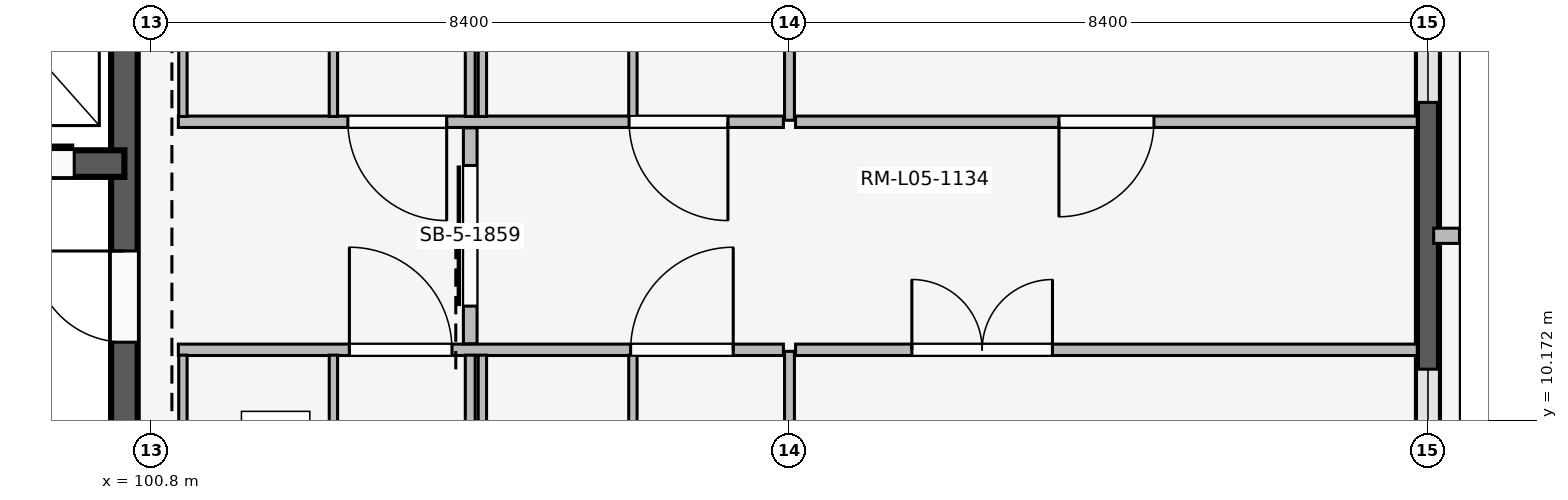
"""IFC4 building model, lengths in metres.
Left out: names, types, materials, properties, quantities, classifications, styles, units other than length and angle.
Written with IfcOpenShell. Run it as: python <this file> out.ifc"""

import sys

from ifc_helpers import new_model, si_unit, direction, frame, frame_2d, origin, place, context, subcontext, project, spatial, rectangle, extrude, element, fill, save


model = new_model("IFC4")
c1 = context("Model", 3, precision=1e-05, world=origin(), true_north=direction((0.0, 1.0)))
c2 = subcontext(c1, "Body", "Model", "MODEL_VIEW")
j1 = project(units=[si_unit("LENGTHUNIT", "METRE"), si_unit("PLANEANGLEUNIT", "RADIAN")], contexts=[c1])
p1 = place(None, origin())
s1 = spatial("IfcSite", under=j1, at=p1, CompositionType="ELEMENT")
p2 = place(p1, origin())
s2 = spatial("IfcBuilding", under=s1, at=p2, CompositionType="ELEMENT")
p3 = place(p2, frame((0.0, 0.0, 20.4)))
s3 = spatial("IfcBuildingStorey", under=s2, at=p3, CompositionType="ELEMENT", Elevation=20.4)
p4 = place(p3, frame((117.6, 16.48, 0.0), z_axis=(0.0, 0.0, 1.0), x_axis=(0.0, -1.0, 0.0)))
e1 = element("IfcWall", 1, at=p4, inside=s3, PredefinedType="SOLIDWALL", context=c2, shape_type="SweptSolid", body=[
    extrude(rectangle(XDim=7.76, YDim=0.29, at=frame_2d((3.88, 0.0))), origin(), (0.0, 0.0, 1.0), 3.34),
])
p5 = place(p4, frame((0.925, 0.0, 0.85)))
e2 = element("IfcOpeningElement", 2, at=p5, cuts=e1, PredefinedType="OPENING", context=c2, shape_type="SweptSolid", body=[
    extrude(rectangle(XDim=1.2, YDim=1.55, at=frame_2d((0.6, 0.775))), frame((0.0, 0.155, 0.0), z_axis=(0.0, -1.0, 0.0), x_axis=(1.0, 0.0, 0.0)), (0.0, 0.0, 1.0), 0.31),
])
p6 = place(p4, frame((5.635, 0.0, 0.85)))
e3 = element("IfcOpeningElement", 3, at=p6, cuts=e1, PredefinedType="OPENING", context=c2, shape_type="SweptSolid", body=[
    extrude(rectangle(XDim=1.2, YDim=1.55, at=frame_2d((0.6, 0.775))), frame((0.0, 0.155, 0.0), z_axis=(0.0, -1.0, 0.0), x_axis=(1.0, 0.0, 0.0)), (0.0, 0.0, 1.0), 0.31),
])
p7 = place(p3, frame((117.675, 12.6, 0.0), z_axis=(0.0, 0.0, 1.0), x_axis=(1.0, 0.0, 0.0)))
e4 = element("IfcWall", 4, at=p7, inside=s3, PredefinedType="ELEMENTEDWALL", context=c2, shape_type="SweptSolid", body=[
    extrude(rectangle(XDim=0.34, YDim=0.2, at=frame_2d((0.17, 0.0))), origin(), (0.0, 0.0, 1.0), 3.32),
])
p8 = place(p3, frame((100.45, 8.8, 0.0), z_axis=(0.0, 0.0, 1.0), x_axis=(0.0, 1.0, 0.0)))
e5 = element("IfcWall", 5, at=p8, inside=s3, PredefinedType="SHEAR", context=c2, shape_type="SweptSolid", body=[
    extrude(rectangle(XDim=7.55, YDim=0.35, at=frame_2d((3.775, 0.0))), origin(), (0.0, 0.0, 1.0), 3.92),
])
p9 = place(p8, frame((2.4, 0.0, 0.0)))
e6 = element("IfcOpeningElement", 6, at=p9, cuts=e5, PredefinedType="OPENING", context=c2, shape_type="SweptSolid", body=[
    extrude(rectangle(XDim=1.2, YDim=2.2, at=frame_2d((0.6, 1.1))), frame((0.0, 0.185, 0.0), z_axis=(0.0, -1.0, 0.0), x_axis=(1.0, 0.0, 0.0)), (0.0, 0.0, 1.0), 0.37),
])
p10 = place(p3, frame((96.65, 13.55, 0.0), z_axis=(0.0, 0.0, 1.0), x_axis=(1.0, 0.0, 0.0)))
e7 = element("IfcWall", 7, at=p10, inside=s3, PredefinedType="SHEAR", context=c2, shape_type="SweptSolid", body=[
    extrude(rectangle(XDim=3.8, YDim=0.35, at=frame_2d((1.9, 0.0))), origin(), (0.0, 0.0, 1.0), 3.92),
])
p11 = place(p10, frame((0.32, 0.0, 0.0)))
e8 = element("IfcOpeningElement", 8, at=p11, cuts=e7, PredefinedType="OPENING", context=c2, shape_type="SweptSolid", body=[
    extrude(rectangle(XDim=1.4, YDim=2.25, at=frame_2d((0.7, 1.125))), frame((0.0, 0.185, 0.0), z_axis=(0.0, -1.0, 0.0), x_axis=(1.0, 0.0, 0.0)), (0.0, 0.0, 1.0), 0.37),
])
p12 = place(p10, frame((2.04, 0.0, 0.0)))
e9 = element("IfcOpeningElement", 9, at=p12, cuts=e7, PredefinedType="OPENING", context=c2, shape_type="SweptSolid", body=[
    extrude(rectangle(XDim=1.1, YDim=2.15, at=frame_2d((0.55, 1.075))), frame((0.0, 0.185, 0.0), z_axis=(0.0, -1.0, 0.0), x_axis=(1.0, 0.0, 0.0)), (0.0, 0.0, 1.0), 0.37),
])
p13 = place(p3, frame((101.16, 11.1, 0.0), z_axis=(0.0, 0.0, 1.0), x_axis=(1.0, 0.0, 0.0)))
e10 = element("IfcWall", 10, at=p13, inside=s3, PredefinedType="PARTITIONING", context=c2, shape_type="SweptSolid", body=[
    extrude(rectangle(XDim=7.96, YDim=0.15, at=frame_2d((3.98, 0.0))), origin(), (0.0, 0.0, 1.0), 3.32),
])
p14 = place(p13, frame((2.25, 0.0, 0.0)))
e11 = element("IfcOpeningElement", 11, at=p14, cuts=e10, PredefinedType="OPENING", context=c2, shape_type="SweptSolid", body=[
    extrude(rectangle(XDim=1.35, YDim=2.25, at=frame_2d((0.675, 1.125))), frame((0.0, 0.085, 0.0), z_axis=(0.0, -1.0, 0.0), x_axis=(1.0, 0.0, 0.0)), (0.0, 0.0, 1.0), 0.17),
])
p15 = place(p13, frame((5.95, 0.0, 0.0)))
e12 = element("IfcOpeningElement", 12, at=p15, cuts=e10, PredefinedType="OPENING", context=c2, shape_type="SweptSolid", body=[
    extrude(rectangle(XDim=1.35, YDim=2.25, at=frame_2d((0.675, 1.125))), frame((0.0, 0.085, 0.0), z_axis=(0.0, -1.0, 0.0), x_axis=(1.0, 0.0, 0.0)), (0.0, 0.0, 1.0), 0.17),
])
p16 = place(p3, frame((105.0, 0.1, 0.0), z_axis=(0.0, 0.0, 1.0), x_axis=(0.0, 1.0, 0.0)))
e13 = element("IfcWall", 13, at=p16, inside=s3, PredefinedType="PARTITIONING", context=c2, shape_type="SweptSolid", body=[
    extrude(rectangle(XDim=10.93, YDim=0.13, at=frame_2d((5.465, 0.0))), origin(), (0.0, 0.0, 1.0), 3.32),
])
for number, where, z_axis, x_axis in (
    (14, (101.22, 8.42, 0.0), (0.0, 0.0, 1.0), (0.0, 1.0, 0.0)),
    (15, (103.2, 8.42, 0.0), (0.0, 0.0, 1.0), (0.0, 1.0, 0.0)),
    (16, (105.16, 8.42, 0.0), (0.0, 0.0, 1.0), (0.0, 1.0, 0.0)),
    (17, (107.14, 8.42, 0.0), (0.0, 0.0, 1.0), (0.0, 1.0, 0.0)),
):
    element("IfcWall", number, at=place(p3, frame(where, z_axis=z_axis, x_axis=x_axis)), inside=s3, PredefinedType="PARTITIONING", context=c2, shape_type="SweptSolid", body=[
        extrude(rectangle(XDim=2.61, YDim=0.11, at=frame_2d((1.305, 0.0))), origin(), (0.0, 0.0, 1.0), 3.32),
    ])
p17 = place(p3, frame((109.12, 14.1, 0.0), z_axis=(0.0, 0.0, 1.0), x_axis=(-1.0, 0.0, 0.0)))
e18 = element("IfcWall", 18, at=p17, inside=s3, PredefinedType="PARTITIONING", context=c2, shape_type="SweptSolid", body=[
    extrude(rectangle(XDim=7.96, YDim=0.15, at=frame_2d((3.98, 0.0))), origin(), (0.0, 0.0, 1.0), 3.32),
])
p18 = place(p17, frame((0.73, 0.0, 0.0)))
e19 = element("IfcOpeningElement", 19, at=p18, cuts=e18, PredefinedType="OPENING", context=c2, shape_type="SweptSolid", body=[
    extrude(rectangle(XDim=1.3, YDim=2.25, at=frame_2d((0.65, 1.125))), frame((0.0, 0.085, 0.0), z_axis=(0.0, -1.0, 0.0), x_axis=(1.0, 0.0, 0.0)), (0.0, 0.0, 1.0), 0.17),
])
p19 = place(p17, frame((4.43, 0.0, 0.0)))
e20 = element("IfcOpeningElement", 20, at=p19, cuts=e18, PredefinedType="OPENING", context=c2, shape_type="SweptSolid", body=[
    extrude(rectangle(XDim=1.3, YDim=2.25, at=frame_2d((0.65, 1.125))), frame((0.0, 0.085, 0.0), z_axis=(0.0, -1.0, 0.0), x_axis=(1.0, 0.0, 0.0)), (0.0, 0.0, 1.0), 0.17),
])
p20 = place(p3, frame((105.0, 14.17, 0.0), z_axis=(0.0, 0.0, 1.0), x_axis=(0.0, 1.0, 0.0)))
e21 = element("IfcWall", 21, at=p20, inside=s3, PredefinedType="PARTITIONING", context=c2, shape_type="SweptSolid", body=[
    extrude(rectangle(XDim=10.93, YDim=0.13, at=frame_2d((5.465, 0.0))), origin(), (0.0, 0.0, 1.0), 3.32),
])
for number, where, z_axis, x_axis in (
    (22, (101.22, 14.17, 0.0), (0.0, 0.0, 1.0), (0.0, 1.0, 0.0)),
    (23, (103.2, 14.17, 0.0), (0.0, 0.0, 1.0), (0.0, 1.0, 0.0)),
    (24, (105.16, 14.17, 0.0), (0.0, 0.0, 1.0), (0.0, 1.0, 0.0)),
    (25, (107.14, 14.17, 0.0), (0.0, 0.0, 1.0), (0.0, 1.0, 0.0)),
):
    element("IfcWall", number, at=place(p3, frame(where, z_axis=z_axis, x_axis=x_axis)), inside=s3, PredefinedType="PARTITIONING", context=c2, shape_type="SweptSolid", body=[
        extrude(rectangle(XDim=2.61, YDim=0.11, at=frame_2d((1.305, 0.0))), origin(), (0.0, 0.0, 1.0), 3.32),
    ])
p21 = place(p3, frame((105.0, 11.18, 0.0), z_axis=(0.0, 0.0, 1.0), x_axis=(0.0, 1.0, 0.0)))
e26 = element("IfcWall", 26, at=p21, inside=s3, PredefinedType="PARTITIONING", context=c2, shape_type="SweptSolid", body=[
    extrude(rectangle(XDim=2.84, YDim=0.18, at=frame_2d((1.42, 0.0))), origin(), (0.0, 0.0, 1.0), 3.32),
])
p22 = place(p21, frame((0.495, 0.0, 0.0)))
e27 = element("IfcOpeningElement", 27, at=p22, cuts=e26, PredefinedType="OPENING", context=c2, shape_type="SweptSolid", body=[
    extrude(rectangle(XDim=1.85, YDim=2.3, at=frame_2d((0.925, 1.15))), frame((0.0, 0.1, 0.0), z_axis=(0.0, -1.0, 0.0), x_axis=(1.0, 0.0, 0.0)), (0.0, 0.0, 1.0), 0.2),
])
p23 = place(p3, frame((109.2, 0.14, 0.0), z_axis=(0.0, 0.0, 1.0), x_axis=(0.0, 1.0, 0.0)))
e28 = element("IfcWall", 28, at=p23, inside=s3, PredefinedType="PARTITIONING", context=c2, shape_type="SweptSolid", body=[
    extrude(rectangle(XDim=10.94, YDim=0.13, at=frame_2d((5.47, 0.0))), origin(), (0.0, 0.0, 1.0), 3.32),
])
p24 = place(p3, frame((109.2, 14.12, 0.0), z_axis=(0.0, 0.0, 1.0), x_axis=(0.0, 1.0, 0.0)))
e29 = element("IfcWall", 29, at=p24, inside=s3, PredefinedType="PARTITIONING", context=c2, shape_type="SweptSolid", body=[
    extrude(rectangle(XDim=10.94, YDim=0.13, at=frame_2d((5.47, 0.0))), origin(), (0.0, 0.0, 1.0), 3.32),
])
p25 = place(p3, frame((109.28, 11.1, 0.0), z_axis=(0.0, 0.0, 1.0), x_axis=(1.0, 0.0, 0.0)))
e30 = element("IfcWall", 30, at=p25, inside=s3, PredefinedType="PARTITIONING", context=c2, shape_type="SweptSolid", body=[
    extrude(rectangle(XDim=8.18, YDim=0.15, at=frame_2d((4.09, 0.0))), origin(), (0.0, 0.0, 1.0), 3.32),
])
p26 = place(p25, frame((1.53, 0.0, 0.0)))
e31 = element("IfcOpeningElement", 31, at=p26, cuts=e30, PredefinedType="OPENING", context=c2, shape_type="SweptSolid", body=[
    extrude(rectangle(XDim=1.85, YDim=2.3, at=frame_2d((0.925, 1.15))), frame((0.0, 0.085, 0.0), z_axis=(0.0, -1.0, 0.0), x_axis=(1.0, 0.0, 0.0)), (0.0, 0.0, 1.0), 0.17),
])
p27 = place(p3, frame((117.46, 14.1, 0.0), z_axis=(0.0, 0.0, 1.0), x_axis=(-1.0, 0.0, 0.0)))
e32 = element("IfcWall", 32, at=p27, inside=s3, PredefinedType="PARTITIONING", context=c2, shape_type="SweptSolid", body=[
    extrude(rectangle(XDim=8.18, YDim=0.15, at=frame_2d((4.09, 0.0))), origin(), (0.0, 0.0, 1.0), 3.32),
])
p28 = place(p27, frame((3.465, 0.0, 0.0)))
e33 = element("IfcOpeningElement", 33, at=p28, cuts=e32, PredefinedType="OPENING", context=c2, shape_type="SweptSolid", body=[
    extrude(rectangle(XDim=1.25, YDim=2.2, at=frame_2d((0.625, 1.1))), frame((0.0, 0.085, 0.0), z_axis=(0.0, -1.0, 0.0), x_axis=(1.0, 0.0, 0.0)), (0.0, 0.0, 1.0), 0.17),
])
p29 = place(p5, origin())
e34 = element("IfcWindow", 34, at=p29, inside=s3, PartitioningType="SINGLE_PANEL", PredefinedType="WINDOW", context=c2, shape_type="SweptSolid", body=[
    extrude(rectangle(XDim=1.2, YDim=1.55, at=frame_2d((0.6, 0.775))), frame((0.0, 0.03, 0.0), z_axis=(0.0, -1.0, 0.0), x_axis=(1.0, 0.0, 0.0)), (0.0, 0.0, 1.0), 0.06),
])
fill(e2, e34)
p30 = place(p6, origin())
e35 = element("IfcWindow", 35, at=p30, inside=s3, PartitioningType="SINGLE_PANEL", PredefinedType="WINDOW", context=c2, shape_type="SweptSolid", body=[
    extrude(rectangle(XDim=1.2, YDim=1.55, at=frame_2d((0.6, 0.775))), frame((0.0, 0.03, 0.0), z_axis=(0.0, -1.0, 0.0), x_axis=(1.0, 0.0, 0.0)), (0.0, 0.0, 1.0), 0.06),
])
fill(e3, e35)
p31 = place(p9, origin())
e36 = element("IfcDoor", 36, at=p31, inside=s3, OperationType="SINGLE_SWING_RIGHT", PredefinedType="DOOR", context=c2, shape_type="SweptSolid", body=[
    extrude(rectangle(XDim=1.2, YDim=2.2, at=frame_2d((0.6, 1.1))), frame((0.0, 0.025, 0.0), z_axis=(0.0, -1.0, 0.0), x_axis=(1.0, 0.0, 0.0)), (0.0, 0.0, 1.0), 0.05),
])
fill(e6, e36)
p32 = place(p12, origin())
e37 = element("IfcDoor", 37, at=p32, inside=s3, OperationType="SLIDING_TO_LEFT", PredefinedType="DOOR", context=c2, shape_type="SweptSolid", body=[
    extrude(rectangle(XDim=1.1, YDim=2.15, at=frame_2d((0.55, 1.075))), frame((0.0, 0.025, 0.0), z_axis=(0.0, -1.0, 0.0), x_axis=(1.0, 0.0, 0.0)), (0.0, 0.0, 1.0), 0.05),
])
fill(e9, e37)
p33 = place(p14, origin())
e38 = element("IfcDoor", 38, at=p33, inside=s3, OperationType="SINGLE_SWING_LEFT", PredefinedType="DOOR", context=c2, shape_type="SweptSolid", body=[
    extrude(rectangle(XDim=1.35, YDim=2.25, at=frame_2d((0.675, 1.125))), frame((0.0, 0.025, 0.0), z_axis=(0.0, -1.0, 0.0), x_axis=(1.0, 0.0, 0.0)), (0.0, 0.0, 1.0), 0.05),
])
fill(e11, e38)
p34 = place(p15, origin())
e39 = element("IfcDoor", 39, at=p34, inside=s3, OperationType="SINGLE_SWING_RIGHT", PredefinedType="DOOR", context=c2, shape_type="SweptSolid", body=[
    extrude(rectangle(XDim=1.35, YDim=2.25, at=frame_2d((0.675, 1.125))), frame((0.0, 0.025, 0.0), z_axis=(0.0, -1.0, 0.0), x_axis=(1.0, 0.0, 0.0)), (0.0, 0.0, 1.0), 0.05),
])
fill(e12, e39)
p35 = place(p18, origin())
e40 = element("IfcDoor", 40, at=p35, inside=s3, OperationType="SINGLE_SWING_LEFT", PredefinedType="DOOR", context=c2, shape_type="SweptSolid", body=[
    extrude(rectangle(XDim=1.3, YDim=2.25, at=frame_2d((0.65, 1.125))), frame((0.0, 0.025, 0.0), z_axis=(0.0, -1.0, 0.0), x_axis=(1.0, 0.0, 0.0)), (0.0, 0.0, 1.0), 0.05),
])
fill(e19, e40)
p36 = place(p19, origin())
e41 = element("IfcDoor", 41, at=p36, inside=s3, OperationType="SINGLE_SWING_LEFT", PredefinedType="DOOR", context=c2, shape_type="SweptSolid", body=[
    extrude(rectangle(XDim=1.3, YDim=2.25, at=frame_2d((0.65, 1.125))), frame((0.0, 0.025, 0.0), z_axis=(0.0, -1.0, 0.0), x_axis=(1.0, 0.0, 0.0)), (0.0, 0.0, 1.0), 0.05),
])
fill(e20, e41)
p37 = place(p22, origin())
e42 = element("IfcDoor", 42, at=p37, inside=s3, OperationType="SLIDING_TO_LEFT", PredefinedType="DOOR", context=c2, shape_type="SweptSolid", body=[
    extrude(rectangle(XDim=1.85, YDim=2.3, at=frame_2d((0.925, 1.15))), frame((0.0, 0.025, 0.0), z_axis=(0.0, -1.0, 0.0), x_axis=(1.0, 0.0, 0.0)), (0.0, 0.0, 1.0), 0.05),
])
fill(e27, e42)
p38 = place(p26, origin())
e43 = element("IfcDoor", 43, at=p38, inside=s3, OperationType="DOUBLE_SWING_LEFT", PredefinedType="DOOR", context=c2, shape_type="SweptSolid", body=[
    extrude(rectangle(XDim=1.85, YDim=2.3, at=frame_2d((0.925, 1.15))), frame((0.0, 0.025, 0.0), z_axis=(0.0, -1.0, 0.0), x_axis=(1.0, 0.0, 0.0)), (0.0, 0.0, 1.0), 0.05),
])
fill(e31, e43)
p39 = place(p28, origin())
e44 = element("IfcDoor", 44, at=p39, inside=s3, OperationType="SINGLE_SWING_RIGHT", PredefinedType="DOOR", context=c2, shape_type="SweptSolid", body=[
    extrude(rectangle(XDim=1.25, YDim=2.2, at=frame_2d((0.625, 1.1))), frame((0.0, 0.025, 0.0), z_axis=(0.0, -1.0, 0.0), x_axis=(1.0, 0.0, 0.0)), (0.0, 0.0, 1.0), 0.05),
])
fill(e33, e44)
save(model, sys.argv[1])
